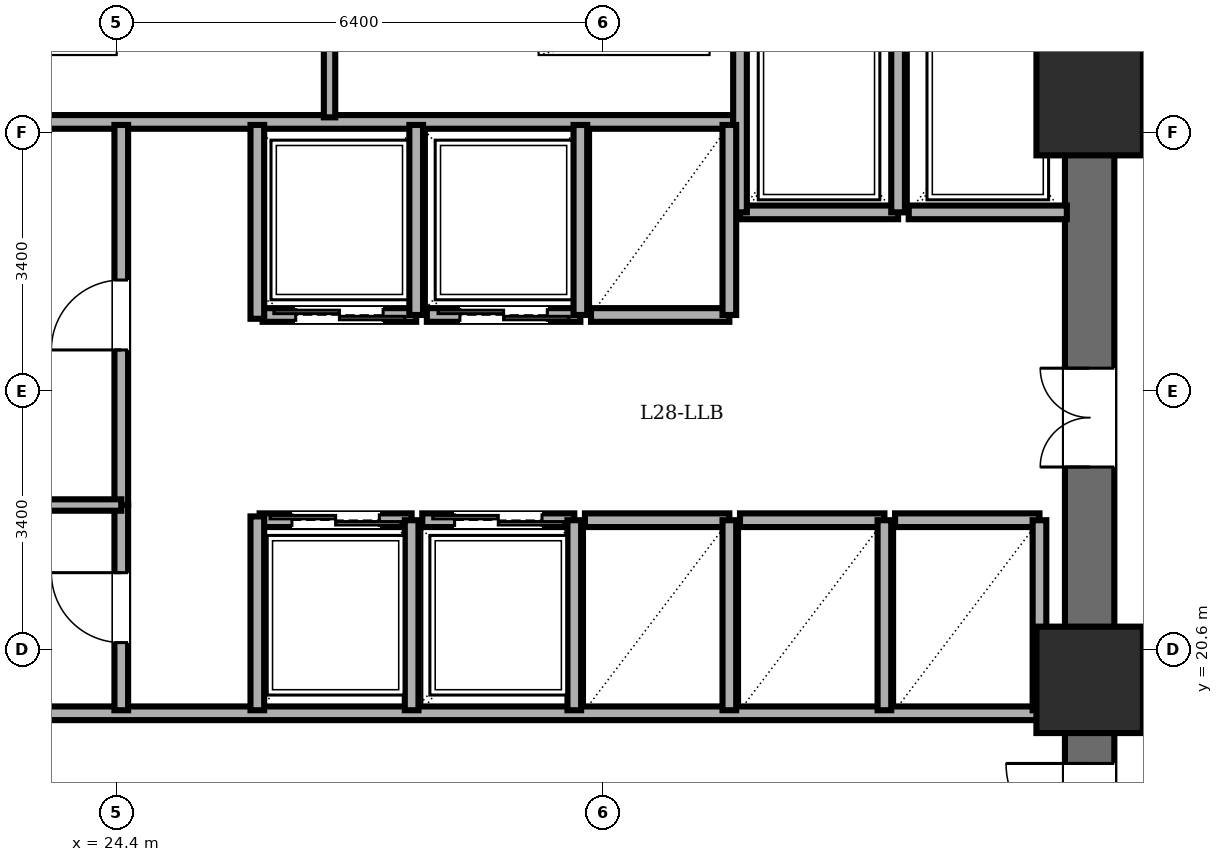
"""IFC4 building model, lengths in metres.
Left out: names, types, materials, properties, quantities, classifications, styles, units other than length and angle.
Written with IfcOpenShell. Run it as: python <this file> out.ifc"""

import sys

from ifc_helpers import new_model, si_unit, direction, frame, frame_2d, origin, origin_2d, place, context, subcontext, project, spatial, rectangle, extrude, element, fill, save


model = new_model("IFC4")
c1 = context("Model", 3, precision=1e-05, world=origin(), true_north=direction((0.0, 1.0)))
c2 = subcontext(c1, "Body", "Model", "MODEL_VIEW")
j1 = project(units=[si_unit("LENGTHUNIT", "METRE"), si_unit("PLANEANGLEUNIT", "RADIAN")], contexts=[c1])
p1 = place(None, origin())
s1 = spatial("IfcSite", under=j1, at=p1, CompositionType="ELEMENT")
p2 = place(p1, origin())
s2 = spatial("IfcBuilding", under=s1, at=p2, CompositionType="ELEMENT")
p3 = place(p2, frame((0.0, 0.0, 107.9)))
s3 = spatial("IfcBuildingStorey", under=s2, at=p3, CompositionType="ELEMENT", Elevation=107.9)
for number, where, z_axis, x_axis in (
    (1, (37.2, 20.2, 0.0), (0.0, 0.0, 1.0), (1.0, 0.0, 0.0)),
    (2, (37.2, 27.8, 0.0), (0.0, 0.0, 1.0), (1.0, 0.0, 0.0)),
):
    element("IfcColumn", number, at=place(p3, frame(where, z_axis=z_axis, x_axis=x_axis)), inside=s3, PredefinedType="COLUMN", context=c2, shape_type="SweptSolid", body=[
        extrude(rectangle(XDim=1.4, YDim=1.4, at=origin_2d()), origin(), (0.0, 0.0, 1.0), 3.6),
    ])
p4 = place(p3, frame((37.2, 14.4, 0.0), z_axis=(0.0, 0.0, 1.0), x_axis=(0.0, 1.0, 0.0)))
e3 = element("IfcWall", 3, at=p4, inside=s3, PredefinedType="SHEAR", context=c2, shape_type="SweptSolid", body=[
    extrude(rectangle(XDim=19.2, YDim=0.65, at=frame_2d((9.6, 0.0))), origin(), (0.0, 0.0, 1.0), 3.4),
])
p5 = place(p4, frame((15.8, 0.0, 0.0)))
e4 = element("IfcOpeningElement", 4, at=p5, cuts=e3, PredefinedType="OPENING", context=c2, shape_type="SweptSolid", body=[
    extrude(rectangle(XDim=1.15, YDim=2.15, at=frame_2d((0.575, 1.075))), frame((0.0, 0.335, 0.0), z_axis=(0.0, -1.0, 0.0), x_axis=(1.0, 0.0, 0.0)), (0.0, 0.0, 1.0), 0.67),
])
p6 = place(p4, frame((3.6, 0.0, 0.0)))
e5 = element("IfcOpeningElement", 5, at=p6, cuts=e3, PredefinedType="OPENING", context=c2, shape_type="SweptSolid", body=[
    extrude(rectangle(XDim=1.1, YDim=2.15, at=frame_2d((0.55, 1.075))), frame((0.0, 0.335, 0.0), z_axis=(0.0, -1.0, 0.0), x_axis=(1.0, 0.0, 0.0)), (0.0, 0.0, 1.0), 0.67),
])
p7 = place(p4, frame((8.6, 0.0, 0.0)))
e6 = element("IfcOpeningElement", 6, at=p7, cuts=e3, PredefinedType="OPENING", context=c2, shape_type="SweptSolid", body=[
    extrude(rectangle(XDim=1.3, YDim=2.2, at=frame_2d((0.65, 1.1))), frame((0.0, 0.335, 0.0), z_axis=(0.0, -1.0, 0.0), x_axis=(1.0, 0.0, 0.0)), (0.0, 0.0, 1.0), 0.67),
])
p8 = place(p3, frame((21.95, 27.54, 0.0), z_axis=(0.0, 0.0, 1.0), x_axis=(1.0, 0.0, 0.0)))
e7 = element("IfcWall", 7, at=p8, inside=s3, PredefinedType="PARTITIONING", context=c2, shape_type="SweptSolid", body=[
    extrude(rectangle(XDim=10.56, YDim=0.18, at=frame_2d((5.28, 0.0))), origin(), (0.0, 0.0, 1.0), 3.4),
])
p9 = place(p3, frame((27.2, 27.6, 0.0), z_axis=(0.0, 0.0, 1.0), x_axis=(0.0, 1.0, 0.0)))
e8 = element("IfcWall", 8, at=p9, inside=s3, PredefinedType="PARTITIONING", context=c2, shape_type="SweptSolid", body=[
    extrude(rectangle(XDim=1.52, YDim=0.15, at=frame_2d((0.76, 0.0))), origin(), (0.0, 0.0, 1.0), 3.4),
])
p10 = place(p3, frame((21.95, 19.76, 0.0), z_axis=(0.0, 0.0, 1.0), x_axis=(1.0, 0.0, 0.0)))
e9 = element("IfcWall", 9, at=p10, inside=s3, PredefinedType="PARTITIONING", context=c2, shape_type="SweptSolid", body=[
    extrude(rectangle(XDim=14.87, YDim=0.18, at=frame_2d((7.435, 0.0))), origin(), (0.0, 0.0, 1.0), 3.4),
])
p11 = place(p3, frame((34.68, 26.35, 0.0), z_axis=(0.0, 0.0, 1.0), x_axis=(-1.0, 0.0, 0.0)))
e10 = element("IfcWall", 10, at=p11, inside=s3, PredefinedType="PARTITIONING", context=c2, shape_type="SweptSolid", body=[
    extrude(rectangle(XDim=2.08, YDim=0.18, at=frame_2d((1.04, 0.0))), origin(), (0.0, 0.0, 1.0), 3.4),
])
for number, where, z_axis, x_axis in (
    (11, (34.68, 26.35, 0.0), (0.0, 0.0, 1.0), (0.0, 1.0, 0.0)),
    (12, (32.6, 29.08, 0.0), (0.0, 0.0, 1.0), (0.0, -1.0, 0.0)),
):
    element("IfcWall", number, at=place(p3, frame(where, z_axis=z_axis, x_axis=x_axis)), inside=s3, PredefinedType="PARTITIONING", context=c2, shape_type="SweptSolid", body=[
        extrude(rectangle(XDim=2.73, YDim=0.18, at=frame_2d((1.365, 0.0))), origin(), (0.0, 0.0, 1.0), 3.4),
    ])
p12 = place(p3, frame((36.9, 26.35, 0.0), z_axis=(0.0, 0.0, 1.0), x_axis=(-1.0, 0.0, 0.0)))
e13 = element("IfcWall", 13, at=p12, inside=s3, PredefinedType="PARTITIONING", context=c2, shape_type="SweptSolid", body=[
    extrude(rectangle(XDim=2.08, YDim=0.18, at=frame_2d((1.04, 0.0))), origin(), (0.0, 0.0, 1.0), 3.4),
])
p13 = place(p3, frame((28.34, 25.0, 0.0), z_axis=(0.0, 0.0, 1.0), x_axis=(-1.0, 0.0, 0.0)))
e14 = element("IfcWall", 14, at=p13, inside=s3, PredefinedType="PARTITIONING", context=c2, shape_type="SweptSolid", body=[
    extrude(rectangle(XDim=2.02, YDim=0.18, at=frame_2d((1.01, 0.0))), origin(), (0.0, 0.0, 1.0), 3.4),
])
p14 = place(p13, frame((0.435, 0.0, 0.0)))
e15 = element("IfcOpeningElement", 15, at=p14, cuts=e14, PredefinedType="OPENING", context=c2, shape_type="SweptSolid", body=[
    extrude(rectangle(XDim=1.15, YDim=2.2, at=frame_2d((0.575, 1.1))), frame((0.0, 0.1, 0.0), z_axis=(0.0, -1.0, 0.0), x_axis=(1.0, 0.0, 0.0)), (0.0, 0.0, 1.0), 0.2),
])
p15 = place(p3, frame((28.34, 25.0, 0.0), z_axis=(0.0, 0.0, 1.0), x_axis=(0.0, 1.0, 0.0)))
e16 = element("IfcWall", 16, at=p15, inside=s3, PredefinedType="PARTITIONING", context=c2, shape_type="SweptSolid", body=[
    extrude(rectangle(XDim=2.5, YDim=0.18, at=frame_2d((1.25, 0.0))), origin(), (0.0, 0.0, 1.0), 3.4),
])
p16 = place(p3, frame((30.5, 25.0, 0.0), z_axis=(0.0, 0.0, 1.0), x_axis=(-1.0, 0.0, 0.0)))
e17 = element("IfcWall", 17, at=p16, inside=s3, PredefinedType="PARTITIONING", context=c2, shape_type="SweptSolid", body=[
    extrude(rectangle(XDim=2.02, YDim=0.18, at=frame_2d((1.01, 0.0))), origin(), (0.0, 0.0, 1.0), 3.4),
])
p17 = place(p16, frame((0.435, 0.0, 0.0)))
e18 = element("IfcOpeningElement", 18, at=p17, cuts=e17, PredefinedType="OPENING", context=c2, shape_type="SweptSolid", body=[
    extrude(rectangle(XDim=1.15, YDim=2.2, at=frame_2d((0.575, 1.1))), frame((0.0, 0.1, 0.0), z_axis=(0.0, -1.0, 0.0), x_axis=(1.0, 0.0, 0.0)), (0.0, 0.0, 1.0), 0.2),
])
p18 = place(p3, frame((30.5, 25.0, 0.0), z_axis=(0.0, 0.0, 1.0), x_axis=(0.0, 1.0, 0.0)))
e19 = element("IfcWall", 19, at=p18, inside=s3, PredefinedType="PARTITIONING", context=c2, shape_type="SweptSolid", body=[
    extrude(rectangle(XDim=2.5, YDim=0.18, at=frame_2d((1.25, 0.0))), origin(), (0.0, 0.0, 1.0), 3.4),
])
p19 = place(p3, frame((26.28, 22.3, 0.0), z_axis=(0.0, 0.0, 1.0), x_axis=(1.0, 0.0, 0.0)))
e20 = element("IfcWall", 20, at=p19, inside=s3, PredefinedType="PARTITIONING", context=c2, shape_type="SweptSolid", body=[
    extrude(rectangle(XDim=2.0, YDim=0.18, at=frame_2d((1.0, 0.0))), origin(), (0.0, 0.0, 1.0), 3.4),
])
p20 = place(p19, frame((0.425, 0.0, 0.0)))
e21 = element("IfcOpeningElement", 21, at=p20, cuts=e20, PredefinedType="OPENING", context=c2, shape_type="SweptSolid", body=[
    extrude(rectangle(XDim=1.15, YDim=2.2, at=frame_2d((0.575, 1.1))), frame((0.0, 0.1, 0.0), z_axis=(0.0, -1.0, 0.0), x_axis=(1.0, 0.0, 0.0)), (0.0, 0.0, 1.0), 0.2),
])
p21 = place(p3, frame((28.28, 19.8, 0.0), z_axis=(0.0, 0.0, 1.0), x_axis=(0.0, 1.0, 0.0)))
e22 = element("IfcWall", 22, at=p21, inside=s3, PredefinedType="PARTITIONING", context=c2, shape_type="SweptSolid", body=[
    extrude(rectangle(XDim=2.5, YDim=0.18, at=frame_2d((1.25, 0.0))), origin(), (0.0, 0.0, 1.0), 3.4),
])
p22 = place(p3, frame((28.42, 22.3, 0.0), z_axis=(0.0, 0.0, 1.0), x_axis=(1.0, 0.0, 0.0)))
e23 = element("IfcWall", 23, at=p22, inside=s3, PredefinedType="PARTITIONING", context=c2, shape_type="SweptSolid", body=[
    extrude(rectangle(XDim=2.0, YDim=0.18, at=frame_2d((1.0, 0.0))), origin(), (0.0, 0.0, 1.0), 3.4),
])
p23 = place(p22, frame((0.425, 0.0, 0.0)))
e24 = element("IfcOpeningElement", 24, at=p23, cuts=e23, PredefinedType="OPENING", context=c2, shape_type="SweptSolid", body=[
    extrude(rectangle(XDim=1.15, YDim=2.2, at=frame_2d((0.575, 1.1))), frame((0.0, 0.1, 0.0), z_axis=(0.0, -1.0, 0.0), x_axis=(1.0, 0.0, 0.0)), (0.0, 0.0, 1.0), 0.2),
])
p24 = place(p3, frame((30.42, 19.8, 0.0), z_axis=(0.0, 0.0, 1.0), x_axis=(0.0, 1.0, 0.0)))
e25 = element("IfcWall", 25, at=p24, inside=s3, PredefinedType="PARTITIONING", context=c2, shape_type="SweptSolid", body=[
    extrude(rectangle(XDim=2.5, YDim=0.18, at=frame_2d((1.25, 0.0))), origin(), (0.0, 0.0, 1.0), 3.4),
])
p25 = place(p3, frame((32.46, 25.0, 0.0), z_axis=(0.0, 0.0, 1.0), x_axis=(-1.0, 0.0, 0.0)))
e26 = element("IfcWall", 26, at=p25, inside=s3, PredefinedType="PARTITIONING", context=c2, shape_type="SweptSolid", body=[
    extrude(rectangle(XDim=1.82, YDim=0.18, at=frame_2d((0.91, 0.0))), origin(), (0.0, 0.0, 1.0), 3.4),
])
p26 = place(p3, frame((32.46, 25.0, 0.0), z_axis=(0.0, 0.0, 1.0), x_axis=(0.0, 1.0, 0.0)))
e27 = element("IfcWall", 27, at=p26, inside=s3, PredefinedType="PARTITIONING", context=c2, shape_type="SweptSolid", body=[
    extrude(rectangle(XDim=2.5, YDim=0.18, at=frame_2d((1.25, 0.0))), origin(), (0.0, 0.0, 1.0), 3.4),
])
p27 = place(p3, frame((30.56, 22.3, 0.0), z_axis=(0.0, 0.0, 1.0), x_axis=(1.0, 0.0, 0.0)))
e28 = element("IfcWall", 28, at=p27, inside=s3, PredefinedType="PARTITIONING", context=c2, shape_type="SweptSolid", body=[
    extrude(rectangle(XDim=1.9, YDim=0.18, at=frame_2d((0.95, 0.0))), origin(), (0.0, 0.0, 1.0), 3.4),
])
p28 = place(p3, frame((32.46, 19.8, 0.0), z_axis=(0.0, 0.0, 1.0), x_axis=(0.0, 1.0, 0.0)))
e29 = element("IfcWall", 29, at=p28, inside=s3, PredefinedType="PARTITIONING", context=c2, shape_type="SweptSolid", body=[
    extrude(rectangle(XDim=2.5, YDim=0.18, at=frame_2d((1.25, 0.0))), origin(), (0.0, 0.0, 1.0), 3.4),
])
p29 = place(p3, frame((32.6, 22.3, 0.0), z_axis=(0.0, 0.0, 1.0), x_axis=(1.0, 0.0, 0.0)))
e30 = element("IfcWall", 30, at=p29, inside=s3, PredefinedType="PARTITIONING", context=c2, shape_type="SweptSolid", body=[
    extrude(rectangle(XDim=1.9, YDim=0.18, at=frame_2d((0.95, 0.0))), origin(), (0.0, 0.0, 1.0), 3.4),
])
p30 = place(p3, frame((34.5, 19.8, 0.0), z_axis=(0.0, 0.0, 1.0), x_axis=(0.0, 1.0, 0.0)))
e31 = element("IfcWall", 31, at=p30, inside=s3, PredefinedType="PARTITIONING", context=c2, shape_type="SweptSolid", body=[
    extrude(rectangle(XDim=2.5, YDim=0.18, at=frame_2d((1.25, 0.0))), origin(), (0.0, 0.0, 1.0), 3.4),
])
p31 = place(p3, frame((34.64, 22.3, 0.0), z_axis=(0.0, 0.0, 1.0), x_axis=(1.0, 0.0, 0.0)))
e32 = element("IfcWall", 32, at=p31, inside=s3, PredefinedType="PARTITIONING", context=c2, shape_type="SweptSolid", body=[
    extrude(rectangle(XDim=1.9, YDim=0.18, at=frame_2d((0.95, 0.0))), origin(), (0.0, 0.0, 1.0), 3.4),
])
p32 = place(p3, frame((36.54, 19.8, 0.0), z_axis=(0.0, 0.0, 1.0), x_axis=(0.0, 1.0, 0.0)))
e33 = element("IfcWall", 33, at=p32, inside=s3, PredefinedType="PARTITIONING", context=c2, shape_type="SweptSolid", body=[
    extrude(rectangle(XDim=2.5, YDim=0.18, at=frame_2d((1.25, 0.0))), origin(), (0.0, 0.0, 1.0), 3.4),
])
p33 = place(p3, frame((24.46, 22.5, 0.0), z_axis=(0.0, 0.0, 1.0), x_axis=(0.0, 1.0, 0.0)))
e34 = element("IfcWall", 34, at=p33, inside=s3, PredefinedType="PARTITIONING", context=c2, shape_type="SweptSolid", body=[
    extrude(rectangle(XDim=5.0, YDim=0.18, at=frame_2d((2.5, 0.0))), origin(), (0.0, 0.0, 1.0), 3.4),
])
p34 = place(p33, frame((2.04, 0.0, 0.0)))
e35 = element("IfcOpeningElement", 35, at=p34, cuts=e34, PredefinedType="OPENING", context=c2, shape_type="SweptSolid", body=[
    extrude(rectangle(XDim=0.92, YDim=2.1, at=frame_2d((0.46, 1.05))), frame((0.0, 0.1, 0.0), z_axis=(0.0, -1.0, 0.0), x_axis=(1.0, 0.0, 0.0)), (0.0, 0.0, 1.0), 0.2),
])
p35 = place(p3, frame((24.46, 19.8, 0.0), z_axis=(0.0, 0.0, 1.0), x_axis=(0.0, 1.0, 0.0)))
e36 = element("IfcWall", 36, at=p35, inside=s3, PredefinedType="PARTITIONING", context=c2, shape_type="SweptSolid", body=[
    extrude(rectangle(XDim=2.7, YDim=0.18, at=frame_2d((1.35, 0.0))), origin(), (0.0, 0.0, 1.0), 3.4),
])
p36 = place(p35, frame((0.89, 0.0, 0.0)))
e37 = element("IfcOpeningElement", 37, at=p36, cuts=e36, PredefinedType="OPENING", context=c2, shape_type="SweptSolid", body=[
    extrude(rectangle(XDim=0.92, YDim=2.1, at=frame_2d((0.46, 1.05))), frame((0.0, 0.1, 0.0), z_axis=(0.0, -1.0, 0.0), x_axis=(1.0, 0.0, 0.0)), (0.0, 0.0, 1.0), 0.2),
])
p37 = place(p3, frame((21.95, 22.5, 0.0), z_axis=(0.0, 0.0, 1.0), x_axis=(1.0, 0.0, 0.0)))
e38 = element("IfcWall", 38, at=p37, inside=s3, PredefinedType="PARTITIONING", context=c2, shape_type="SweptSolid", body=[
    extrude(rectangle(XDim=2.51, YDim=0.15, at=frame_2d((1.255, 0.0))), origin(), (0.0, 0.0, 1.0), 3.4),
])
for number, where, z_axis, x_axis in (
    (39, (26.25, 24.95, 0.0), (0.0, 0.0, 1.0), (0.0, 1.0, 0.0)),
    (40, (26.25, 19.8, 0.0), (0.0, 0.0, 1.0), (0.0, 1.0, 0.0)),
):
    element("IfcWall", number, at=place(p3, frame(where, z_axis=z_axis, x_axis=x_axis)), inside=s3, PredefinedType="PARTITIONING", context=c2, shape_type="SweptSolid", body=[
        extrude(rectangle(XDim=2.55, YDim=0.18, at=frame_2d((1.275, 0.0))), origin(), (0.0, 0.0, 1.0), 3.4),
    ])
p38 = place(p6, origin())
e41 = element("IfcDoor", 41, at=p38, inside=s3, OperationType="SINGLE_SWING_RIGHT", PredefinedType="DOOR", context=c2, shape_type="SweptSolid", body=[
    extrude(rectangle(XDim=1.1, YDim=2.15, at=frame_2d((0.55, 1.075))), frame((0.0, 0.025, 0.0), z_axis=(0.0, -1.0, 0.0), x_axis=(1.0, 0.0, 0.0)), (0.0, 0.0, 1.0), 0.05),
])
fill(e5, e41)
p39 = place(p14, origin())
e42 = element("IfcDoor", 42, at=p39, inside=s3, OperationType="DOUBLE_DOOR_SLIDING", PredefinedType="DOOR", context=c2, shape_type="SweptSolid", body=[
    extrude(rectangle(XDim=1.15, YDim=2.2, at=frame_2d((0.575, 1.1))), frame((0.0, 0.025, 0.0), z_axis=(0.0, -1.0, 0.0), x_axis=(1.0, 0.0, 0.0)), (0.0, 0.0, 1.0), 0.05),
])
fill(e15, e42)
p40 = place(p17, origin())
e43 = element("IfcDoor", 43, at=p40, inside=s3, OperationType="DOUBLE_DOOR_SLIDING", PredefinedType="DOOR", context=c2, shape_type="SweptSolid", body=[
    extrude(rectangle(XDim=1.15, YDim=2.2, at=frame_2d((0.575, 1.1))), frame((0.0, 0.025, 0.0), z_axis=(0.0, -1.0, 0.0), x_axis=(1.0, 0.0, 0.0)), (0.0, 0.0, 1.0), 0.05),
])
fill(e18, e43)
p41 = place(p20, origin())
e44 = element("IfcDoor", 44, at=p41, inside=s3, OperationType="DOUBLE_DOOR_SLIDING", PredefinedType="DOOR", context=c2, shape_type="SweptSolid", body=[
    extrude(rectangle(XDim=1.15, YDim=2.2, at=frame_2d((0.575, 1.1))), frame((0.0, 0.025, 0.0), z_axis=(0.0, -1.0, 0.0), x_axis=(1.0, 0.0, 0.0)), (0.0, 0.0, 1.0), 0.05),
])
fill(e21, e44)
p42 = place(p23, origin())
e45 = element("IfcDoor", 45, at=p42, inside=s3, OperationType="DOUBLE_DOOR_SLIDING", PredefinedType="DOOR", context=c2, shape_type="SweptSolid", body=[
    extrude(rectangle(XDim=1.15, YDim=2.2, at=frame_2d((0.575, 1.1))), frame((0.0, 0.025, 0.0), z_axis=(0.0, -1.0, 0.0), x_axis=(1.0, 0.0, 0.0)), (0.0, 0.0, 1.0), 0.05),
])
fill(e24, e45)
p43 = place(p34, origin())
e46 = element("IfcDoor", 46, at=p43, inside=s3, OperationType="SINGLE_SWING_LEFT", PredefinedType="DOOR", context=c2, shape_type="SweptSolid", body=[
    extrude(rectangle(XDim=0.92, YDim=2.1, at=frame_2d((0.46, 1.05))), frame((0.0, 0.025, 0.0), z_axis=(0.0, -1.0, 0.0), x_axis=(1.0, 0.0, 0.0)), (0.0, 0.0, 1.0), 0.05),
])
fill(e35, e46)
p44 = place(p36, origin())
e47 = element("IfcDoor", 47, at=p44, inside=s3, OperationType="SINGLE_SWING_RIGHT", PredefinedType="DOOR", context=c2, shape_type="SweptSolid", body=[
    extrude(rectangle(XDim=0.92, YDim=2.1, at=frame_2d((0.46, 1.05))), frame((0.0, 0.025, 0.0), z_axis=(0.0, -1.0, 0.0), x_axis=(1.0, 0.0, 0.0)), (0.0, 0.0, 1.0), 0.05),
])
fill(e37, e47)
p45 = place(p7, origin())
e48 = element("IfcDoor", 48, at=p45, inside=s3, OperationType="DOUBLE_DOOR_SINGLE_SWING", PredefinedType="DOOR", context=c2, shape_type="SweptSolid", body=[
    extrude(rectangle(XDim=1.3, YDim=2.2, at=frame_2d((0.65, 1.1))), frame((0.0, 0.025, 0.0), z_axis=(0.0, -1.0, 0.0), x_axis=(1.0, 0.0, 0.0)), (0.0, 0.0, 1.0), 0.05),
])
fill(e6, e48)
save(model, sys.argv[1])
